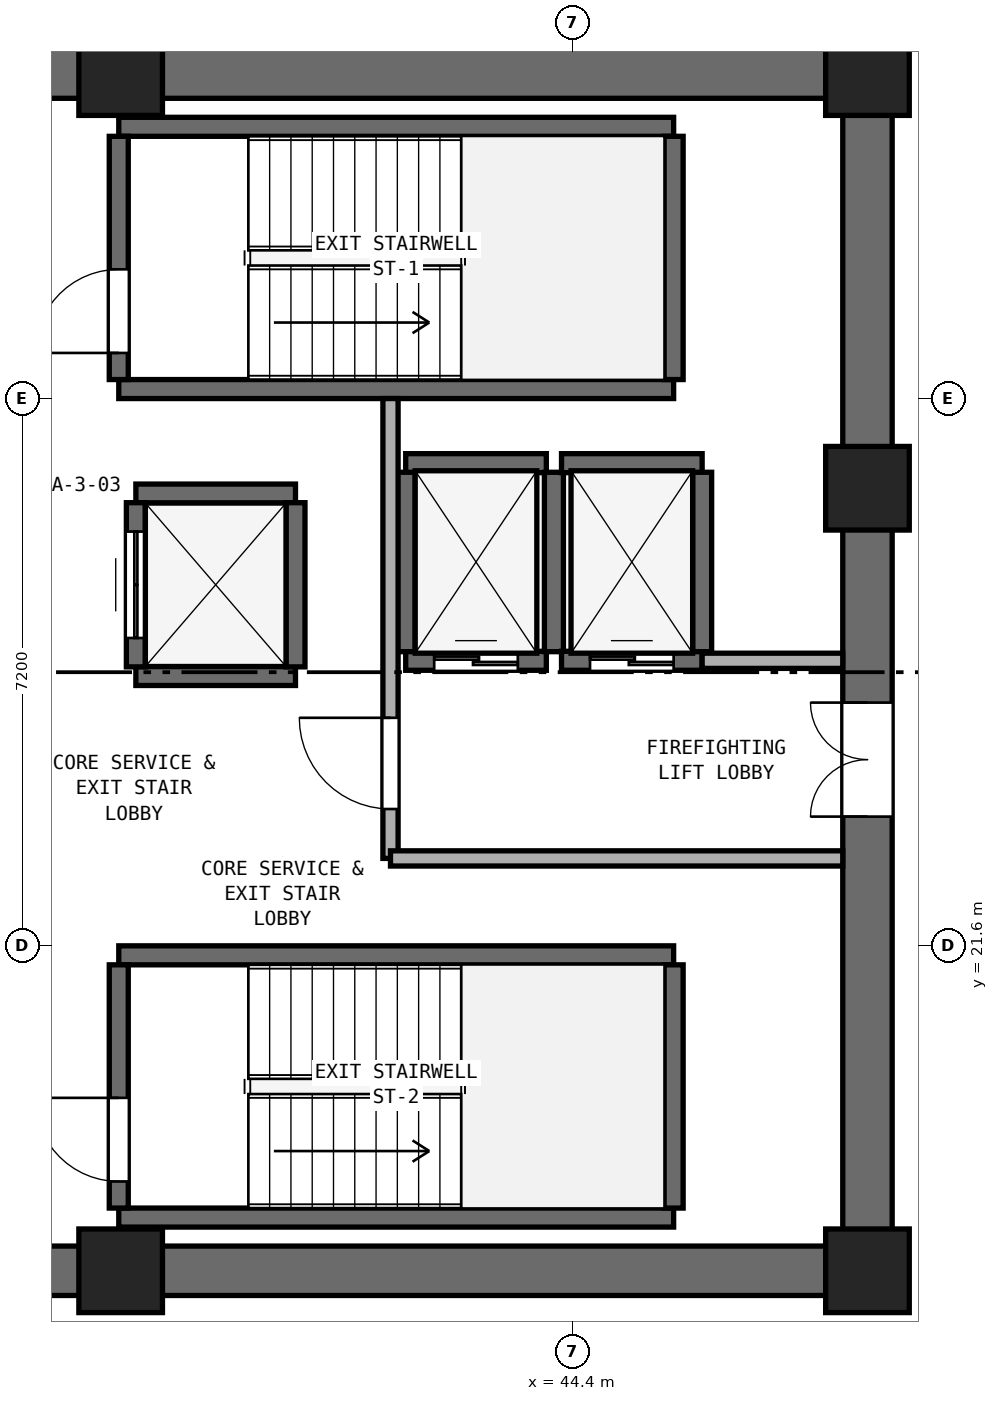
"""IFC4 building model, lengths in metres.
Left out: names, types, materials, properties, quantities, classifications, styles, units other than length and angle.
Written with IfcOpenShell. Run it as: python <this file> out.ifc"""

import sys

from ifc_helpers import new_model, si_unit, direction, frame, frame_2d, origin, origin_2d, place, context, subcontext, project, spatial, rectangle, extrude, element, fill, save


model = new_model("IFC4")
c1 = context("Model", 3, precision=1e-05, world=origin(), true_north=direction((0.0, 1.0)))
c2 = subcontext(c1, "Body", "Model", "MODEL_VIEW")
j1 = project(units=[si_unit("LENGTHUNIT", "METRE"), si_unit("PLANEANGLEUNIT", "RADIAN")], contexts=[c1])
p1 = place(None, origin())
s1 = spatial("IfcSite", under=j1, at=p1, CompositionType="ELEMENT")
p2 = place(p1, origin())
s2 = spatial("IfcBuilding", under=s1, at=p2, CompositionType="ELEMENT")
p3 = place(p2, frame((0.0, 0.0, 101.0)))
s3 = spatial("IfcBuildingStorey", under=s2, at=p3, CompositionType="ELEMENT", Elevation=101.0)
for number, where, z_axis, x_axis in (
    (1, (25.4, 17.325, 0.0), (0.0, 0.0, 1.0), (1.0, 0.0, 0.0)),
    (2, (25.4, 33.075, 0.0), (0.0, 0.0, 1.0), (1.0, 0.0, 0.0)),
):
    element("IfcWall", number, at=place(p3, frame(where, z_axis=z_axis, x_axis=x_axis)), inside=s3, PredefinedType="SHEAR", context=c2, shape_type="SweptSolid", body=[
        extrude(rectangle(XDim=23.2, YDim=0.65, at=frame_2d((11.6, 0.0))), origin(), (0.0, 0.0, 1.0), 3.525),
    ])
p4 = place(p3, frame((48.275, 17.65, 0.0), z_axis=(0.0, 0.0, 1.0), x_axis=(0.0, 1.0, 0.0)))
e3 = element("IfcWall", 3, at=p4, inside=s3, PredefinedType="SHEAR", context=c2, shape_type="SweptSolid", body=[
    extrude(rectangle(XDim=15.1, YDim=0.65, at=frame_2d((7.55, 0.0))), origin(), (0.0, 0.0, 1.0), 3.525),
])
p5 = place(p4, frame((5.65, 0.0, 0.0)))
e4 = element("IfcOpeningElement", 4, at=p5, cuts=e3, PredefinedType="OPENING", context=c2, shape_type="SweptSolid", body=[
    extrude(rectangle(XDim=1.5, YDim=2.15, at=frame_2d((0.75, 1.075))), frame((0.0, 0.335, 0.0), z_axis=(0.0, -1.0, 0.0), x_axis=(1.0, 0.0, 0.0)), (0.0, 0.0, 1.0), 0.67),
])
for number, where, z_axis, x_axis in (
    (5, (38.45, 17.325, 0.0), (0.0, 0.0, 1.0), (1.0, 0.0, 0.0)),
    (6, (48.275, 17.325, 0.0), (0.0, 0.0, 1.0), (1.0, 0.0, 0.0)),
    (7, (48.275, 27.62, 0.0), (0.0, 0.0, 1.0), (1.0, 0.0, 0.0)),
    (8, (48.275, 33.075, 0.0), (0.0, 0.0, 1.0), (1.0, 0.0, 0.0)),
    (9, (38.45, 33.075, 0.0), (0.0, 0.0, 1.0), (1.0, 0.0, 0.0)),
):
    element("IfcColumn", number, at=place(p3, frame(where, z_axis=z_axis, x_axis=x_axis)), inside=s3, PredefinedType="PILASTER", context=c2, shape_type="SweptSolid", body=[
        extrude(rectangle(XDim=1.1, YDim=1.1, at=origin_2d()), origin(), (0.0, 0.0, 1.0), 3.8),
    ])
for number, where, z_axis, x_axis in (
    (10, (38.425, 28.925, 0.0), (0.0, 0.0, 1.0), (1.0, 0.0, 0.0)),
    (11, (38.425, 32.375, 0.0), (0.0, 0.0, 1.0), (1.0, 0.0, 0.0)),
):
    element("IfcWall", number, at=place(p3, frame(where, z_axis=z_axis, x_axis=x_axis)), inside=s3, PredefinedType="SHEAR", context=c2, shape_type="SweptSolid", body=[
        extrude(rectangle(XDim=7.3, YDim=0.25, at=frame_2d((3.65, 0.0))), origin(), (0.0, 0.0, 1.0), 3.525),
    ])
p6 = place(p3, frame((38.425, 29.05, 0.0), z_axis=(0.0, 0.0, 1.0), x_axis=(0.0, 1.0, 0.0)))
e12 = element("IfcWall", 12, at=p6, inside=s3, PredefinedType="SHEAR", context=c2, shape_type="SweptSolid", body=[
    extrude(rectangle(XDim=3.2, YDim=0.25, at=frame_2d((1.6, 0.0))), origin(), (0.0, 0.0, 1.0), 3.525),
])
p7 = place(p6, frame((0.35, 0.0, 0.0)))
e13 = element("IfcOpeningElement", 13, at=p7, cuts=e12, PredefinedType="OPENING", context=c2, shape_type="SweptSolid", body=[
    extrude(rectangle(XDim=1.1, YDim=2.15, at=frame_2d((0.55, 1.075))), frame((0.0, 0.135, 0.0), z_axis=(0.0, -1.0, 0.0), x_axis=(1.0, 0.0, 0.0)), (0.0, 0.0, 1.0), 0.27),
])
p8 = place(p3, frame((45.725, 29.05, 0.0), z_axis=(0.0, 0.0, 1.0), x_axis=(0.0, 1.0, 0.0)))
e14 = element("IfcWall", 14, at=p8, inside=s3, PredefinedType="SHEAR", context=c2, shape_type="SweptSolid", body=[
    extrude(rectangle(XDim=3.2, YDim=0.25, at=frame_2d((1.6, 0.0))), origin(), (0.0, 0.0, 1.0), 3.525),
])
for number, where, z_axis, x_axis in (
    (15, (38.425, 18.025, 0.0), (0.0, 0.0, 1.0), (1.0, 0.0, 0.0)),
    (16, (38.425, 21.475, 0.0), (0.0, 0.0, 1.0), (1.0, 0.0, 0.0)),
):
    element("IfcWall", number, at=place(p3, frame(where, z_axis=z_axis, x_axis=x_axis)), inside=s3, PredefinedType="SHEAR", context=c2, shape_type="SweptSolid", body=[
        extrude(rectangle(XDim=7.3, YDim=0.25, at=frame_2d((3.65, 0.0))), origin(), (0.0, 0.0, 1.0), 3.525),
    ])
p9 = place(p3, frame((38.425, 18.15, 0.0), z_axis=(0.0, 0.0, 1.0), x_axis=(0.0, 1.0, 0.0)))
e17 = element("IfcWall", 17, at=p9, inside=s3, PredefinedType="SHEAR", context=c2, shape_type="SweptSolid", body=[
    extrude(rectangle(XDim=3.2, YDim=0.25, at=frame_2d((1.6, 0.0))), origin(), (0.0, 0.0, 1.0), 3.525),
])
p10 = place(p9, frame((0.35, 0.0, 0.0)))
e18 = element("IfcOpeningElement", 18, at=p10, cuts=e17, PredefinedType="OPENING", context=c2, shape_type="SweptSolid", body=[
    extrude(rectangle(XDim=1.1, YDim=2.15, at=frame_2d((0.55, 1.075))), frame((0.0, 0.135, 0.0), z_axis=(0.0, -1.0, 0.0), x_axis=(1.0, 0.0, 0.0)), (0.0, 0.0, 1.0), 0.27),
])
p11 = place(p3, frame((45.725, 18.15, 0.0), z_axis=(0.0, 0.0, 1.0), x_axis=(0.0, 1.0, 0.0)))
e19 = element("IfcWall", 19, at=p11, inside=s3, PredefinedType="SHEAR", context=c2, shape_type="SweptSolid", body=[
    extrude(rectangle(XDim=3.2, YDim=0.25, at=frame_2d((1.6, 0.0))), origin(), (0.0, 0.0, 1.0), 3.525),
])
p12 = place(p3, frame((42.2, 25.35, 0.0), z_axis=(0.0, 0.0, 1.0), x_axis=(1.0, 0.0, 0.0)))
e20 = element("IfcWall", 20, at=p12, inside=s3, PredefinedType="SHEAR", context=c2, shape_type="SweptSolid", body=[
    extrude(rectangle(XDim=1.85, YDim=0.25, at=frame_2d((0.925, 0.0))), origin(), (0.0, 0.0, 1.0), 3.525),
])
p13 = place(p12, frame((0.375, 0.0, 0.0)))
e21 = element("IfcOpeningElement", 21, at=p13, cuts=e20, PredefinedType="OPENING", context=c2, shape_type="SweptSolid", body=[
    extrude(rectangle(XDim=1.1, YDim=2.15, at=frame_2d((0.55, 1.075))), frame((0.0, 0.135, 0.0), z_axis=(0.0, -1.0, 0.0), x_axis=(1.0, 0.0, 0.0)), (0.0, 0.0, 1.0), 0.27),
])
p14 = place(p3, frame((42.2, 27.95, 0.0), z_axis=(0.0, 0.0, 1.0), x_axis=(1.0, 0.0, 0.0)))
e22 = element("IfcWall", 22, at=p14, inside=s3, PredefinedType="SHEAR", context=c2, shape_type="SweptSolid", body=[
    extrude(rectangle(XDim=1.85, YDim=0.25, at=frame_2d((0.925, 0.0))), origin(), (0.0, 0.0, 1.0), 3.525),
])
for number, where, z_axis, x_axis in (
    (23, (42.2, 25.47, 0.0), (0.0, 0.0, 1.0), (0.0, 1.0, 0.0)),
    (24, (44.15, 25.47, 0.0), (0.0, 0.0, 1.0), (0.0, 1.0, 0.0)),
):
    element("IfcWall", number, at=place(p3, frame(where, z_axis=z_axis, x_axis=x_axis)), inside=s3, PredefinedType="SHEAR", context=c2, shape_type="SweptSolid", body=[
        extrude(rectangle(XDim=2.36, YDim=0.25, at=frame_2d((1.18, 0.0))), origin(), (0.0, 0.0, 1.0), 3.525),
    ])
p15 = place(p3, frame((44.25, 25.35, 0.0), z_axis=(0.0, 0.0, 1.0), x_axis=(1.0, 0.0, 0.0)))
e25 = element("IfcWall", 25, at=p15, inside=s3, PredefinedType="SHEAR", context=c2, shape_type="SweptSolid", body=[
    extrude(rectangle(XDim=1.85, YDim=0.25, at=frame_2d((0.925, 0.0))), origin(), (0.0, 0.0, 1.0), 3.525),
])
p16 = place(p15, frame((0.375, 0.0, 0.0)))
e26 = element("IfcOpeningElement", 26, at=p16, cuts=e25, PredefinedType="OPENING", context=c2, shape_type="SweptSolid", body=[
    extrude(rectangle(XDim=1.1, YDim=2.15, at=frame_2d((0.55, 1.075))), frame((0.0, 0.135, 0.0), z_axis=(0.0, -1.0, 0.0), x_axis=(1.0, 0.0, 0.0)), (0.0, 0.0, 1.0), 0.27),
])
p17 = place(p3, frame((44.25, 27.95, 0.0), z_axis=(0.0, 0.0, 1.0), x_axis=(1.0, 0.0, 0.0)))
e27 = element("IfcWall", 27, at=p17, inside=s3, PredefinedType="SHEAR", context=c2, shape_type="SweptSolid", body=[
    extrude(rectangle(XDim=1.85, YDim=0.25, at=frame_2d((0.925, 0.0))), origin(), (0.0, 0.0, 1.0), 3.525),
])
p18 = place(p3, frame((46.1, 25.47, 0.0), z_axis=(0.0, 0.0, 1.0), x_axis=(0.0, 1.0, 0.0)))
e28 = element("IfcWall", 28, at=p18, inside=s3, PredefinedType="SHEAR", context=c2, shape_type="SweptSolid", body=[
    extrude(rectangle(XDim=2.36, YDim=0.25, at=frame_2d((1.18, 0.0))), origin(), (0.0, 0.0, 1.0), 3.525),
])
for number, where, z_axis, x_axis in (
    (29, (38.65, 25.15, 0.0), (0.0, 0.0, 1.0), (1.0, 0.0, 0.0)),
    (30, (38.65, 27.55, 0.0), (0.0, 0.0, 1.0), (1.0, 0.0, 0.0)),
):
    element("IfcWall", number, at=place(p3, frame(where, z_axis=z_axis, x_axis=x_axis)), inside=s3, PredefinedType="SHEAR", context=c2, shape_type="SweptSolid", body=[
        extrude(rectangle(XDim=2.1, YDim=0.25, at=frame_2d((1.05, 0.0))), origin(), (0.0, 0.0, 1.0), 3.525),
    ])
p19 = place(p3, frame((38.65, 25.27, 0.0), z_axis=(0.0, 0.0, 1.0), x_axis=(0.0, 1.0, 0.0)))
e31 = element("IfcWall", 31, at=p19, inside=s3, PredefinedType="SHEAR", context=c2, shape_type="SweptSolid", body=[
    extrude(rectangle(XDim=2.16, YDim=0.25, at=frame_2d((1.08, 0.0))), origin(), (0.0, 0.0, 1.0), 3.525),
])
p20 = place(p19, frame((0.38, 0.0, 0.0)))
e32 = element("IfcOpeningElement", 32, at=p20, cuts=e31, PredefinedType="OPENING", context=c2, shape_type="SweptSolid", body=[
    extrude(rectangle(XDim=1.4, YDim=2.2, at=frame_2d((0.7, 1.1))), frame((0.0, 0.135, 0.0), z_axis=(0.0, -1.0, 0.0), x_axis=(1.0, 0.0, 0.0)), (0.0, 0.0, 1.0), 0.27),
])
p21 = place(p3, frame((40.75, 25.27, 0.0), z_axis=(0.0, 0.0, 1.0), x_axis=(0.0, 1.0, 0.0)))
e33 = element("IfcWall", 33, at=p21, inside=s3, PredefinedType="SHEAR", context=c2, shape_type="SweptSolid", body=[
    extrude(rectangle(XDim=2.16, YDim=0.25, at=frame_2d((1.08, 0.0))), origin(), (0.0, 0.0, 1.0), 3.525),
])
p22 = place(p3, frame((42.0, 22.75, 0.0), z_axis=(0.0, 0.0, 1.0), x_axis=(0.0, 1.0, 0.0)))
e34 = element("IfcWall", 34, at=p22, inside=s3, PredefinedType="SOLIDWALL", context=c2, shape_type="SweptSolid", body=[
    extrude(rectangle(XDim=6.05, YDim=0.2, at=frame_2d((3.025, 0.0))), origin(), (0.0, 0.0, 1.0), 3.525),
])
p23 = place(p22, frame((0.65, 0.0, 0.0)))
e35 = element("IfcOpeningElement", 35, at=p23, cuts=e34, PredefinedType="OPENING", context=c2, shape_type="SweptSolid", body=[
    extrude(rectangle(XDim=1.2, YDim=2.15, at=frame_2d((0.6, 1.075))), frame((0.0, 0.11, 0.0), z_axis=(0.0, -1.0, 0.0), x_axis=(1.0, 0.0, 0.0)), (0.0, 0.0, 1.0), 0.22),
])
p24 = place(p3, frame((42.0, 22.75, 0.0), z_axis=(0.0, 0.0, 1.0), x_axis=(1.0, 0.0, 0.0)))
e36 = element("IfcWall", 36, at=p24, inside=s3, PredefinedType="SOLIDWALL", context=c2, shape_type="SweptSolid", body=[
    extrude(rectangle(XDim=5.95, YDim=0.2, at=frame_2d((2.975, 0.0))), origin(), (0.0, 0.0, 1.0), 3.525),
])
p25 = place(p3, frame((46.1, 25.35, 0.0), z_axis=(0.0, 0.0, 1.0), x_axis=(1.0, 0.0, 0.0)))
e37 = element("IfcWall", 37, at=p25, inside=s3, PredefinedType="SOLIDWALL", context=c2, shape_type="SweptSolid", body=[
    extrude(rectangle(XDim=1.85, YDim=0.2, at=frame_2d((0.925, 0.0))), origin(), (0.0, 0.0, 1.0), 3.525),
])
p26 = place(p7, origin())
e38 = element("IfcDoor", 38, at=p26, inside=s3, OperationType="SINGLE_SWING_LEFT", PredefinedType="DOOR", context=c2, shape_type="SweptSolid", body=[
    extrude(rectangle(XDim=1.1, YDim=2.15, at=frame_2d((0.55, 1.075))), frame((0.0, 0.025, 0.0), z_axis=(0.0, -1.0, 0.0), x_axis=(1.0, 0.0, 0.0)), (0.0, 0.0, 1.0), 0.05),
])
fill(e13, e38)
p27 = place(p10, origin())
e39 = element("IfcDoor", 39, at=p27, inside=s3, OperationType="SINGLE_SWING_RIGHT", PredefinedType="DOOR", context=c2, shape_type="SweptSolid", body=[
    extrude(rectangle(XDim=1.1, YDim=2.15, at=frame_2d((0.55, 1.075))), frame((0.0, 0.025, 0.0), z_axis=(0.0, -1.0, 0.0), x_axis=(1.0, 0.0, 0.0)), (0.0, 0.0, 1.0), 0.05),
])
fill(e18, e39)
p28 = place(p13, origin())
e40 = element("IfcDoor", 40, at=p28, inside=s3, OperationType="DOUBLE_DOOR_SLIDING", PredefinedType="DOOR", context=c2, shape_type="SweptSolid", body=[
    extrude(rectangle(XDim=1.1, YDim=2.15, at=frame_2d((0.55, 1.075))), frame((0.0, 0.025, 0.0), z_axis=(0.0, -1.0, 0.0), x_axis=(1.0, 0.0, 0.0)), (0.0, 0.0, 1.0), 0.05),
])
fill(e21, e40)
p29 = place(p16, origin())
e41 = element("IfcDoor", 41, at=p29, inside=s3, OperationType="DOUBLE_DOOR_SLIDING", PredefinedType="DOOR", context=c2, shape_type="SweptSolid", body=[
    extrude(rectangle(XDim=1.1, YDim=2.15, at=frame_2d((0.55, 1.075))), frame((0.0, 0.025, 0.0), z_axis=(0.0, -1.0, 0.0), x_axis=(1.0, 0.0, 0.0)), (0.0, 0.0, 1.0), 0.05),
])
fill(e26, e41)
p30 = place(p20, origin())
e42 = element("IfcDoor", 42, at=p30, inside=s3, OperationType="DOUBLE_DOOR_SLIDING", PredefinedType="DOOR", context=c2, shape_type="SweptSolid", body=[
    extrude(rectangle(XDim=1.4, YDim=2.2, at=frame_2d((0.7, 1.1))), frame((0.0, 0.025, 0.0), z_axis=(0.0, -1.0, 0.0), x_axis=(1.0, 0.0, 0.0)), (0.0, 0.0, 1.0), 0.05),
])
fill(e32, e42)
p31 = place(p23, origin())
e43 = element("IfcDoor", 43, at=p31, inside=s3, OperationType="SINGLE_SWING_RIGHT", PredefinedType="DOOR", context=c2, shape_type="SweptSolid", body=[
    extrude(rectangle(XDim=1.2, YDim=2.15, at=frame_2d((0.6, 1.075))), frame((0.0, 0.025, 0.0), z_axis=(0.0, -1.0, 0.0), x_axis=(1.0, 0.0, 0.0)), (0.0, 0.0, 1.0), 0.05),
])
fill(e35, e43)
p32 = place(p5, origin())
e44 = element("IfcDoor", 44, at=p32, inside=s3, OperationType="DOUBLE_DOOR_SINGLE_SWING", PredefinedType="DOOR", context=c2, shape_type="SweptSolid", body=[
    extrude(rectangle(XDim=1.5, YDim=2.15, at=frame_2d((0.75, 1.075))), frame((0.0, 0.025, 0.0), z_axis=(0.0, -1.0, 0.0), x_axis=(1.0, 0.0, 0.0)), (0.0, 0.0, 1.0), 0.05),
])
fill(e4, e44)
save(model, sys.argv[1])
